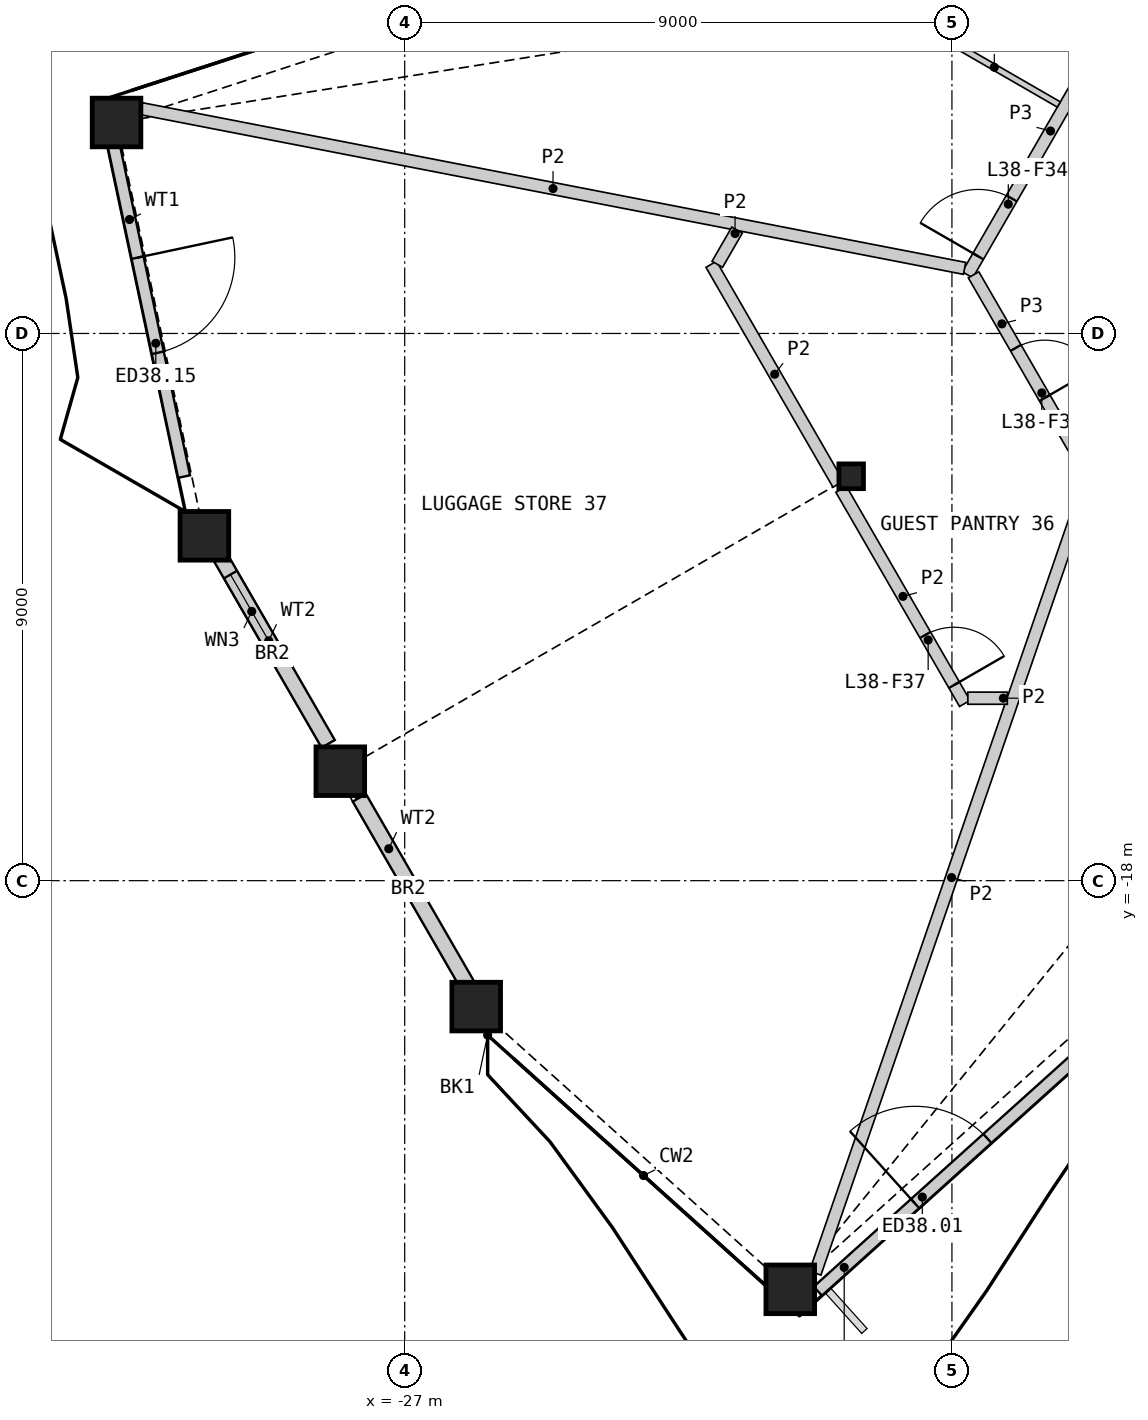
"""IFC4 building model, lengths in metres.
Left out: names, types, materials, properties, quantities, classifications, styles, units other than length and angle.
Written with IfcOpenShell. Run it as: python <this file> out.ifc"""

import sys

from ifc_helpers import new_model, si_unit, direction, frame, frame_2d, origin, origin_2d, place, context, subcontext, project, spatial, rectangle, hollow_rectangle, i_section, extrude, element, fill, save


model = new_model("IFC4")
c1 = context("Model", 3, precision=1e-05, world=origin(), true_north=direction((0.0, 1.0)))
c2 = subcontext(c1, "Body", "Model", "MODEL_VIEW")
j1 = project(units=[si_unit("LENGTHUNIT", "METRE"), si_unit("PLANEANGLEUNIT", "RADIAN")], contexts=[c1])
p1 = place(None, origin())
s1 = spatial("IfcSite", under=j1, at=p1, CompositionType="ELEMENT")
p2 = place(p1, origin())
s2 = spatial("IfcBuilding", under=s1, at=p2, CompositionType="ELEMENT")
p3 = place(p2, frame((0.0, 0.0, 180.0)))
s3 = spatial("IfcBuildingStorey", under=s2, at=p3, CompositionType="ELEMENT", Elevation=180.0)
for number, where, z_axis, x_axis in (
    (1, (-25.823, -20.071, 0.0), (0.0, 0.0, 1.0), (1.0, 0.0, 0.0)),
    (2, (-20.659, -24.722, 0.0), (0.0, 0.0, 1.0), (1.0, 0.0, 0.0)),
    (3, (-31.739, -5.53, 0.0), (0.0, 0.0, 1.0), (1.0, 0.0, 0.0)),
    (4, (-30.294, -12.328, 0.0), (0.0, 0.0, 1.0), (1.0, 0.0, 0.0)),
    (5, (-28.059, -16.2, 0.0), (0.0, 0.0, 1.0), (1.0, 0.0, 0.0)),
):
    element("IfcColumn", number, at=place(p3, frame(where, z_axis=z_axis, x_axis=x_axis)), inside=s3, PredefinedType="COLUMN", context=c2, shape_type="SweptSolid", body=[
        extrude(hollow_rectangle(XDim=0.8, YDim=0.8, WallThickness=0.05, at=origin_2d()), origin(), (0.0, 0.0, 1.0), 3.6),
    ])
p4 = place(p3, frame((-19.657, -11.349, 0.0), z_axis=(0.0, 0.0, 1.0), x_axis=(1.0, 0.0, 0.0)))
e6 = element("IfcColumn", 6, at=p4, inside=s3, PredefinedType="COLUMN", context=c2, shape_type="SweptSolid", body=[
    extrude(i_section(OverallWidth=0.404, OverallDepth=0.407, WebThickness=0.027, FlangeThickness=0.044, at=origin_2d()), origin(), (0.0, 0.0, 1.0), 3.6),
])
p5 = place(p3, frame((-20.205, -24.751, 0.0), z_axis=(0.0, 0.0, 1.0), x_axis=(0.743135964011, 0.669140447883, 0.0)))
e7 = element("IfcWall", 7, at=p5, inside=s3, PredefinedType="SOLIDWALL", context=c2, shape_type="SweptSolid", body=[
    extrude(rectangle(XDim=5.833, YDim=0.2, at=frame_2d((2.917, 0.0))), origin(), (0.0, 0.0, 1.0), 2.701),
])
p6 = place(p5, frame((2.152, 0.0, 0.0)))
e8 = element("IfcOpeningElement", 8, at=p6, cuts=e7, PredefinedType="OPENING", context=c2, shape_type="SweptSolid", body=[
    extrude(rectangle(XDim=1.6, YDim=2.4, at=frame_2d((0.8, 1.2))), frame((0.0, 0.11, 0.0), z_axis=(0.0, -1.0, 0.0), x_axis=(1.0, 0.0, 0.0)), (0.0, 0.0, 1.0), 0.22),
])
p7 = place(p3, frame((-31.826, -5.717, 0.0), z_axis=(0.0, 0.0, 1.0), x_axis=(0.207914487103, -0.978147006361, 0.0)))
e9 = element("IfcWall", 9, at=p7, inside=s3, PredefinedType="SOLIDWALL", context=c2, shape_type="SweptSolid", body=[
    extrude(rectangle(XDim=5.763, YDim=0.2, at=frame_2d((2.882, 0.0))), origin(), (0.0, 0.0, 1.0), 2.701),
])
p8 = place(p7, frame((2.082, 0.0, 0.0)))
e10 = element("IfcOpeningElement", 10, at=p8, cuts=e9, PredefinedType="OPENING", context=c2, shape_type="SweptSolid", body=[
    extrude(rectangle(XDim=1.6, YDim=2.4, at=frame_2d((0.8, 1.2))), frame((0.0, 0.11, 0.0), z_axis=(0.0, -1.0, 0.0), x_axis=(1.0, 0.0, 0.0)), (0.0, 0.0, 1.0), 0.22),
])
p9 = place(p3, frame((-30.215, -12.36, 0.0), z_axis=(0.0, 0.0, 1.0), x_axis=(0.499995984904, -0.866027721889, 0.0)))
e11 = element("IfcWall", 11, at=p9, inside=s3, PredefinedType="SOLIDWALL", context=c2, shape_type="SweptSolid", body=[
    extrude(rectangle(XDim=3.915, YDim=0.25, at=frame_2d((1.957, 0.0))), origin(), (0.0, 0.0, 1.0), 2.701),
])
p10 = place(p9, frame((0.7, 0.0, 1.7)))
e12 = element("IfcOpeningElement", 12, at=p10, cuts=e11, PredefinedType="OPENING", context=c2, shape_type="SweptSolid", body=[
    extrude(rectangle(XDim=1.4, YDim=0.8, at=frame_2d((0.7, 0.4))), frame((0.0, 0.135, 0.0), z_axis=(0.0, -1.0, 0.0), x_axis=(1.0, 0.0, 0.0)), (0.0, 0.0, 1.0), 0.27),
])
p11 = place(p3, frame((-27.745, -16.637, 0.0), z_axis=(0.0, 0.0, 1.0), x_axis=(0.499981047344, -0.866036345829, 0.0)))
e13 = element("IfcWall", 13, at=p11, inside=s3, PredefinedType="SOLIDWALL", context=c2, shape_type="SweptSolid", body=[
    extrude(rectangle(XDim=3.868, YDim=0.25, at=frame_2d((1.934, 0.0))), origin(), (0.0, 0.0, 1.0), 2.701),
])
p12 = place(p3, frame((-17.744, -8.035, 0.0), z_axis=(0.0, 0.0, 1.0), x_axis=(0.49998041698, 0.866036709751, 0.0)))
e14 = element("IfcWall", 14, at=p12, inside=s3, PredefinedType="PARTITIONING", context=c2, shape_type="SweptSolid", body=[
    extrude(rectangle(XDim=5.462, YDim=0.2, at=frame_2d((2.731, 0.0))), origin(), (0.0, 0.0, 1.0), 3.25),
])
p13 = place(p12, frame((0.352, 0.0, 0.0)))
e15 = element("IfcOpeningElement", 15, at=p13, cuts=e14, PredefinedType="OPENING", context=c2, shape_type="SweptSolid", body=[
    extrude(rectangle(XDim=1.1, YDim=2.1, at=frame_2d((0.55, 1.05))), frame((0.0, 0.11, 0.0), z_axis=(0.0, -1.0, 0.0), x_axis=(1.0, 0.0, 0.0)), (0.0, 0.0, 1.0), 0.22),
])
p14 = place(p3, frame((-17.644, -8.035, 0.0), z_axis=(0.0, 0.0, 1.0), x_axis=(0.499958791762, -0.866049194065, 0.0)))
e16 = element("IfcWall", 16, at=p14, inside=s3, PredefinedType="PARTITIONING", context=c2, shape_type="SweptSolid", body=[
    extrude(rectangle(XDim=3.726, YDim=0.2, at=frame_2d((1.863, 0.0))), origin(), (0.0, 0.0, 1.0), 3.25),
])
p15 = place(p14, frame((1.388, 0.0, 0.0)))
e17 = element("IfcOpeningElement", 17, at=p15, cuts=e16, PredefinedType="OPENING", context=c2, shape_type="SweptSolid", body=[
    extrude(rectangle(XDim=0.95, YDim=2.1, at=frame_2d((0.475, 1.05))), frame((0.0, 0.11, 0.0), z_axis=(0.0, -1.0, 0.0), x_axis=(1.0, 0.0, 0.0)), (0.0, 0.0, 1.0), 0.22),
])
p16 = place(p3, frame((-31.329, -5.303, 0.0), z_axis=(0.0, 0.0, 1.0), x_axis=(0.981696755608, -0.190450728612, 0.0)))
e18 = element("IfcWall", 18, at=p16, inside=s3, PredefinedType="PARTITIONING", context=c2, shape_type="SweptSolid", body=[
    extrude(rectangle(XDim=13.79, YDim=0.2, at=frame_2d((6.895, 0.0))), origin(), (0.0, 0.0, 1.0), 2.404),
])
p17 = place(p3, frame((-20.249, -24.455, 0.0), z_axis=(0.0, 0.0, 1.0), x_axis=(0.325902118519, 0.945403516571, 0.0)))
e19 = element("IfcWall", 19, at=p17, inside=s3, PredefinedType="PARTITIONING", context=c2, shape_type="SweptSolid", body=[
    extrude(rectangle(XDim=13.763, YDim=0.2, at=frame_2d((6.881, 0.0))), origin(), (0.0, 0.0, 1.0), 2.404),
])
p18 = place(p3, frame((-21.958, -7.862, 0.0), z_axis=(0.0, 0.0, 1.0), x_axis=(0.499987304225, -0.866032733569, 0.0)))
e20 = element("IfcWall", 20, at=p18, inside=s3, PredefinedType="PARTITIONING", context=c2, shape_type="SweptSolid", body=[
    extrude(rectangle(XDim=4.176, YDim=0.2, at=frame_2d((2.088, 0.0))), origin(), (0.0, 0.0, 1.0), 2.404),
])
p19 = place(p3, frame((-19.822, -11.562, 0.0), z_axis=(0.0, 0.0, 1.0), x_axis=(0.499992600721, -0.866029675718, 0.0)))
e21 = element("IfcWall", 21, at=p19, inside=s3, PredefinedType="PARTITIONING", context=c2, shape_type="SweptSolid", body=[
    extrude(rectangle(XDim=4.068, YDim=0.2, at=frame_2d((2.034, 0.0))), origin(), (0.0, 0.0, 1.0), 2.404),
])
p20 = place(p19, frame((2.767, 0.0, 0.0)))
e22 = element("IfcOpeningElement", 22, at=p20, cuts=e21, PredefinedType="OPENING", context=c2, shape_type="SweptSolid", body=[
    extrude(rectangle(XDim=0.95, YDim=2.1, at=frame_2d((0.475, 1.05))), frame((0.0, 0.11, 0.0), z_axis=(0.0, -1.0, 0.0), x_axis=(1.0, 0.0, 0.0)), (0.0, 0.0, 1.0), 0.22),
])
for number, where, z_axis, x_axis in (
    (23, (-21.859, -7.862, 0.0), (0.0, 0.0, 1.0), (0.5, 0.866, 0.0)),
    (24, (-17.738, -14.999, 0.0), (0.0, 0.0, 1.0), (1.0, 0.0, 0.0)),
):
    element("IfcWall", number, at=place(p3, frame(where, z_axis=z_axis, x_axis=x_axis)), inside=s3, PredefinedType="PARTITIONING", context=c2, shape_type="SweptSolid", body=[
        extrude(rectangle(XDim=0.649, YDim=0.2, at=frame_2d((0.325, 0.0))), origin(), (0.0, 0.0, 1.0), 2.404),
    ])
p21 = place(p3, frame((-18.364, -4.01, 0.0), z_axis=(0.0, 0.0, 1.0), x_axis=(0.866057815567, -0.499943856944, 0.0)))
e25 = element("IfcWall", 25, at=p21, inside=s3, PredefinedType="PARTITIONING", context=c2, shape_type="SweptSolid", body=[
    extrude(rectangle(XDim=2.45, YDim=0.1, at=frame_2d((1.225, 0.0))), origin(), (0.0, 0.0, 1.0), 2.404),
])
p22 = place(p6, origin())
e26 = element("IfcDoor", 26, at=p22, inside=s3, OperationType="DOUBLE_DOOR_SINGLE_SWING", PredefinedType="DOOR", context=c2, shape_type="SweptSolid", body=[
    extrude(rectangle(XDim=1.6, YDim=2.4, at=frame_2d((0.8, 1.2))), frame((0.0, 0.025, 0.0), z_axis=(0.0, -1.0, 0.0), x_axis=(1.0, 0.0, 0.0)), (0.0, 0.0, 1.0), 0.05),
])
fill(e8, e26)
p23 = place(p8, origin())
e27 = element("IfcDoor", 27, at=p23, inside=s3, OperationType="DOUBLE_DOOR_SINGLE_SWING", PredefinedType="DOOR", context=c2, shape_type="SweptSolid", body=[
    extrude(rectangle(XDim=1.6, YDim=2.4, at=frame_2d((0.8, 1.2))), frame((0.0, 0.025, 0.0), z_axis=(0.0, -1.0, 0.0), x_axis=(1.0, 0.0, 0.0)), (0.0, 0.0, 1.0), 0.05),
])
fill(e10, e27)
p24 = place(p10, origin())
e28 = element("IfcWindow", 28, at=p24, inside=s3, PartitioningType="SINGLE_PANEL", PredefinedType="WINDOW", context=c2, shape_type="SweptSolid", body=[
    extrude(rectangle(XDim=1.4, YDim=0.8, at=frame_2d((0.7, 0.4))), frame((0.0, 0.03, 0.0), z_axis=(0.0, -1.0, 0.0), x_axis=(1.0, 0.0, 0.0)), (0.0, 0.0, 1.0), 0.06),
])
fill(e12, e28)
p25 = place(p13, origin())
e29 = element("IfcDoor", 29, at=p25, inside=s3, OperationType="SINGLE_SWING_LEFT", PredefinedType="DOOR", context=c2, shape_type="SweptSolid", body=[
    extrude(rectangle(XDim=1.1, YDim=2.1, at=frame_2d((0.55, 1.05))), frame((0.0, 0.025, 0.0), z_axis=(0.0, -1.0, 0.0), x_axis=(1.0, 0.0, 0.0)), (0.0, 0.0, 1.0), 0.05),
])
fill(e15, e29)
p26 = place(p15, origin())
e30 = element("IfcDoor", 30, at=p26, inside=s3, OperationType="SINGLE_SWING_RIGHT", PredefinedType="DOOR", context=c2, shape_type="SweptSolid", body=[
    extrude(rectangle(XDim=0.95, YDim=2.1, at=frame_2d((0.475, 1.05))), frame((0.0, 0.025, 0.0), z_axis=(0.0, -1.0, 0.0), x_axis=(1.0, 0.0, 0.0)), (0.0, 0.0, 1.0), 0.05),
])
fill(e17, e30)
p27 = place(p20, origin())
e31 = element("IfcDoor", 31, at=p27, inside=s3, OperationType="SINGLE_SWING_RIGHT", PredefinedType="DOOR", context=c2, shape_type="SweptSolid", body=[
    extrude(rectangle(XDim=0.95, YDim=2.1, at=frame_2d((0.475, 1.05))), frame((0.0, 0.025, 0.0), z_axis=(0.0, -1.0, 0.0), x_axis=(1.0, 0.0, 0.0)), (0.0, 0.0, 1.0), 0.05),
])
fill(e22, e31)
save(model, sys.argv[1])
